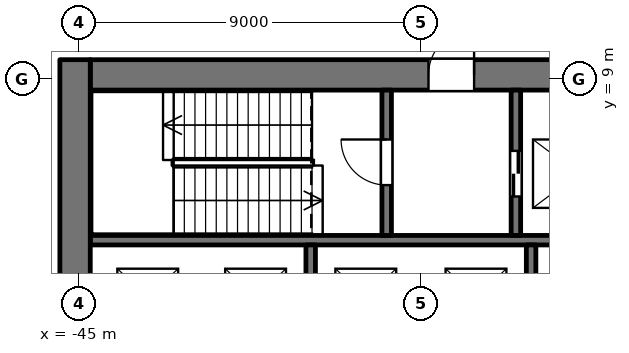
"""IFC4 building model, lengths in metres.
Left out: names, types, materials, properties, quantities, classifications, styles, units other than length and angle.
Written with IfcOpenShell. Run it as: python <this file> out.ifc"""

import sys

from ifc_helpers import new_model, si_unit, direction, frame, frame_2d, origin, place, context, subcontext, project, spatial, rectangle, extrude, element, fill, save


model = new_model("IFC4")
c1 = context("Model", 3, precision=1e-05, world=origin(), true_north=direction((0.0, 1.0)))
c2 = subcontext(c1, "Body", "Model", "MODEL_VIEW")
j1 = project(units=[si_unit("LENGTHUNIT", "METRE"), si_unit("PLANEANGLEUNIT", "RADIAN")], contexts=[c1])
p1 = place(None, origin())
s1 = spatial("IfcSite", under=j1, at=p1, CompositionType="ELEMENT")
p2 = place(p1, origin())
s2 = spatial("IfcBuilding", under=s1, at=p2, CompositionType="ELEMENT")
p3 = place(p2, frame((0.0, 0.0, 22.8)))
s3 = spatial("IfcBuildingStorey", under=s2, at=p3, CompositionType="ELEMENT", Elevation=22.8)
p4 = place(p3, frame((-44.7, 4.75, 0.0), z_axis=(0.0, 0.0, 1.0), x_axis=(1.0, 0.0, 0.0)))
e1 = element("IfcWall", 1, at=p4, inside=s3, PredefinedType="SHEAR", context=c2, shape_type="SweptSolid", body=[
    extrude(rectangle(XDim=17.4, YDim=0.25, at=frame_2d((8.7, 0.0))), origin(), (0.0, 0.0, 1.0), 4.5),
])
p5 = place(p3, frame((-44.7, 9.1, 0.0), z_axis=(0.0, 0.0, 1.0), x_axis=(1.0, 0.0, 0.0)))
e2 = element("IfcWall", 2, at=p5, inside=s3, PredefinedType="SHEAR", context=c2, shape_type="SweptSolid", body=[
    extrude(rectangle(XDim=17.4, YDim=0.8, at=frame_2d((8.7, 0.0))), origin(), (0.0, 0.0, 1.0), 4.5),
])
p6 = place(p5, frame((8.9, 0.0, 0.0)))
e3 = element("IfcOpeningElement", 3, at=p6, cuts=e2, PredefinedType="OPENING", context=c2, shape_type="SweptSolid", body=[
    extrude(rectangle(XDim=1.2, YDim=2.1, at=frame_2d((0.6, 1.05))), frame((0.0, 0.41, 0.0), z_axis=(0.0, -1.0, 0.0), x_axis=(1.0, 0.0, 0.0)), (0.0, 0.0, 1.0), 0.82),
])
p7 = place(p5, frame((14.6, 0.0, 0.0)))
e4 = element("IfcOpeningElement", 4, at=p7, cuts=e2, PredefinedType="OPENING", context=c2, shape_type="SweptSolid", body=[
    extrude(rectangle(XDim=0.9, YDim=2.1, at=frame_2d((0.45, 1.05))), frame((0.0, 0.41, 0.0), z_axis=(0.0, -1.0, 0.0), x_axis=(1.0, 0.0, 0.0)), (0.0, 0.0, 1.0), 0.82),
])
p8 = place(p5, frame((16.1, 0.0, 0.0)))
e5 = element("IfcOpeningElement", 5, at=p8, cuts=e2, PredefinedType="OPENING", context=c2, shape_type="SweptSolid", body=[
    extrude(rectangle(XDim=0.9, YDim=2.1, at=frame_2d((0.45, 1.05))), frame((0.0, 0.41, 0.0), z_axis=(0.0, -1.0, 0.0), x_axis=(1.0, 0.0, 0.0)), (0.0, 0.0, 1.0), 0.82),
])
p9 = place(p3, frame((-45.1, -9.5, 0.0), z_axis=(0.0, 0.0, 1.0), x_axis=(0.0, 1.0, 0.0)))
e6 = element("IfcWall", 6, at=p9, inside=s3, PredefinedType="SHEAR", context=c2, shape_type="SweptSolid", body=[
    extrude(rectangle(XDim=19.0, YDim=0.8, at=frame_2d((9.5, 0.0))), origin(), (0.0, 0.0, 1.0), 4.5),
])
p10 = place(p9, frame((8.3, 0.0, 0.0)))
e7 = element("IfcOpeningElement", 7, at=p10, cuts=e6, PredefinedType="OPENING", context=c2, shape_type="SweptSolid", body=[
    extrude(rectangle(XDim=2.4, YDim=2.1, at=frame_2d((1.2, 1.05))), frame((0.0, 0.41, 0.0), z_axis=(0.0, -1.0, 0.0), x_axis=(1.0, 0.0, 0.0)), (0.0, 0.0, 1.0), 0.82),
])
p11 = place(p3, frame((-38.9, 2.0, 0.0), z_axis=(0.0, 0.0, 1.0), x_axis=(0.0, 1.0, 0.0)))
e8 = element("IfcWall", 8, at=p11, inside=s3, PredefinedType="SHEAR", context=c2, shape_type="SweptSolid", body=[
    extrude(rectangle(XDim=2.625, YDim=0.25, at=frame_2d((1.312, 0.0))), origin(), (0.0, 0.0, 1.0), 4.5),
])
p12 = place(p3, frame((-36.9, 4.875, 0.0), z_axis=(0.0, 0.0, 1.0), x_axis=(0.0, 1.0, 0.0)))
e9 = element("IfcWall", 9, at=p12, inside=s3, PredefinedType="SHEAR", context=c2, shape_type="SweptSolid", body=[
    extrude(rectangle(XDim=3.825, YDim=0.25, at=frame_2d((1.913, 0.0))), origin(), (0.0, 0.0, 1.0), 4.5),
])
p13 = place(p12, frame((1.325, 0.0, 0.0)))
e10 = element("IfcOpeningElement", 10, at=p13, cuts=e9, PredefinedType="OPENING", context=c2, shape_type="SweptSolid", body=[
    extrude(rectangle(XDim=1.2, YDim=2.1, at=frame_2d((0.6, 1.05))), frame((0.0, 0.135, 0.0), z_axis=(0.0, -1.0, 0.0), x_axis=(1.0, 0.0, 0.0)), (0.0, 0.0, 1.0), 0.27),
])
p14 = place(p3, frame((-33.5, 4.875, 0.0), z_axis=(0.0, 0.0, 1.0), x_axis=(0.0, 1.0, 0.0)))
e11 = element("IfcWall", 11, at=p14, inside=s3, PredefinedType="SHEAR", context=c2, shape_type="SweptSolid", body=[
    extrude(rectangle(XDim=3.825, YDim=0.25, at=frame_2d((1.913, 0.0))), origin(), (0.0, 0.0, 1.0), 4.5),
])
p15 = place(p14, frame((1.025, 0.0, 0.0)))
e12 = element("IfcOpeningElement", 12, at=p15, cuts=e11, PredefinedType="OPENING", context=c2, shape_type="SweptSolid", body=[
    extrude(rectangle(XDim=1.2, YDim=2.1, at=frame_2d((0.6, 1.05))), frame((0.0, 0.135, 0.0), z_axis=(0.0, -1.0, 0.0), x_axis=(1.0, 0.0, 0.0)), (0.0, 0.0, 1.0), 0.27),
])
p16 = place(p3, frame((-33.1, 2.0, 0.0), z_axis=(0.0, 0.0, 1.0), x_axis=(0.0, 1.0, 0.0)))
e13 = element("IfcWall", 13, at=p16, inside=s3, PredefinedType="SHEAR", context=c2, shape_type="SweptSolid", body=[
    extrude(rectangle(XDim=2.625, YDim=0.25, at=frame_2d((1.312, 0.0))), origin(), (0.0, 0.0, 1.0), 4.5),
])
p17 = place(p15, origin())
e14 = element("IfcDoor", 14, at=p17, inside=s3, OperationType="SLIDING_TO_LEFT", PredefinedType="DOOR", context=c2, shape_type="SweptSolid", body=[
    extrude(rectangle(XDim=1.2, YDim=2.1, at=frame_2d((0.6, 1.05))), frame((0.0, 0.025, 0.0), z_axis=(0.0, -1.0, 0.0), x_axis=(1.0, 0.0, 0.0)), (0.0, 0.0, 1.0), 0.05),
])
fill(e12, e14)
p18 = place(p13, origin())
e15 = element("IfcDoor", 15, at=p18, inside=s3, OperationType="SINGLE_SWING_RIGHT", PredefinedType="DOOR", context=c2, shape_type="SweptSolid", body=[
    extrude(rectangle(XDim=1.2, YDim=2.1, at=frame_2d((0.6, 1.05))), frame((0.0, 0.025, 0.0), z_axis=(0.0, -1.0, 0.0), x_axis=(1.0, 0.0, 0.0)), (0.0, 0.0, 1.0), 0.05),
])
fill(e10, e15)
p19 = place(p6, origin())
e16 = element("IfcDoor", 16, at=p19, inside=s3, OperationType="SINGLE_SWING_RIGHT", PredefinedType="DOOR", context=c2, shape_type="SweptSolid", body=[
    extrude(rectangle(XDim=1.2, YDim=2.1, at=frame_2d((0.6, 1.05))), frame((0.0, -0.225, 0.0), z_axis=(0.0, -1.0, 0.0), x_axis=(1.0, 0.0, 0.0)), (0.0, 0.0, 1.0), 0.05),
])
fill(e3, e16)
save(model, sys.argv[1])
